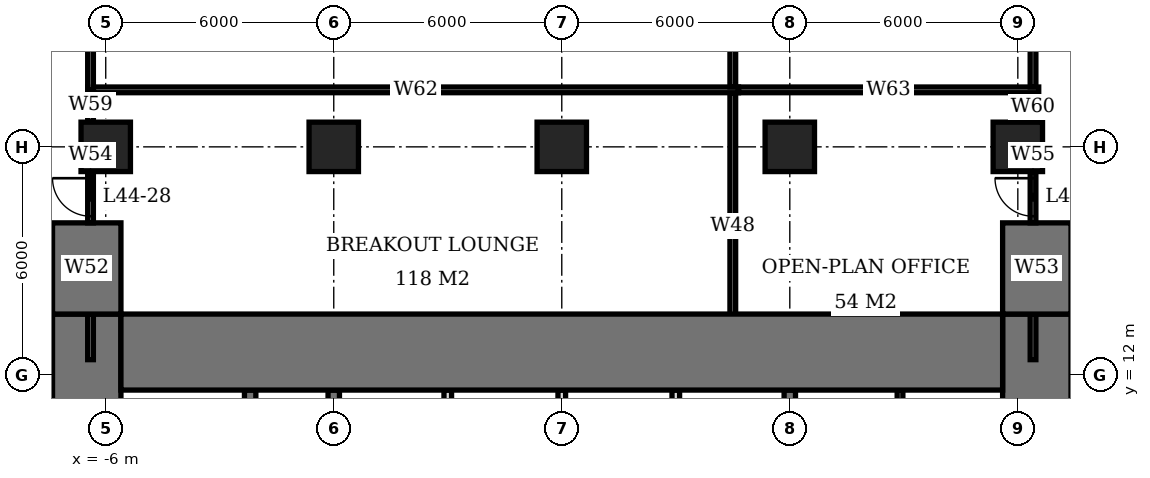
"""IFC4 building model, lengths in metres.
Left out: names, types, materials, properties, quantities, classifications, styles, units other than length and angle.
Written with IfcOpenShell. Run it as: python <this file> out.ifc"""

import sys

from ifc_helpers import new_model, si_unit, direction, frame, frame_2d, origin, origin_2d, place, context, subcontext, project, spatial, rectangle, extrude, element, fill, save


model = new_model("IFC4")
c1 = context("Model", 3, precision=1e-05, world=origin(), true_north=direction((0.0, 1.0)))
c2 = subcontext(c1, "Body", "Model", "MODEL_VIEW")
j1 = project(units=[si_unit("LENGTHUNIT", "METRE"), si_unit("PLANEANGLEUNIT", "RADIAN")], contexts=[c1])
p1 = place(None, origin())
s1 = spatial("IfcSite", under=j1, at=p1, CompositionType="ELEMENT")
p2 = place(p1, origin())
s2 = spatial("IfcBuilding", under=s1, at=p2, CompositionType="ELEMENT")
p3 = place(p2, frame((0.0, 0.0, 181.1)))
s3 = spatial("IfcBuildingStorey", under=s2, at=p3, CompositionType="ELEMENT", Elevation=181.1)
for number, where, z_axis, x_axis in (
    (1, (-6.0, 18.0, 0.0), (0.0, 0.0, 1.0), (1.0, 0.0, 0.0)),
    (2, (0.0, 18.0, 0.0), (0.0, 0.0, 1.0), (1.0, 0.0, 0.0)),
    (3, (6.0, 18.0, 0.0), (0.0, 0.0, 1.0), (1.0, 0.0, 0.0)),
    (4, (12.0, 18.0, 0.0), (0.0, 0.0, 1.0), (1.0, 0.0, 0.0)),
    (5, (18.0, 18.0, 0.0), (0.0, 0.0, 1.0), (1.0, 0.0, 0.0)),
):
    element("IfcColumn", number, at=place(p3, frame(where, z_axis=z_axis, x_axis=x_axis)), inside=s3, PredefinedType="COLUMN", context=c2, shape_type="SweptSolid", body=[
        extrude(rectangle(XDim=1.3, YDim=1.3, at=origin_2d()), origin(), (0.0, 0.0, 1.0), 3.9),
    ])
p4 = place(p3, frame((-5.6, 12.6, 0.0), z_axis=(0.0, 0.0, 1.0), x_axis=(1.0, 0.0, 0.0)))
e6 = element("IfcWall", 6, at=p4, inside=s3, PredefinedType="SHEAR", context=c2, shape_type="SweptSolid", body=[
    extrude(rectangle(XDim=23.2, YDim=2.0, at=frame_2d((11.6, 0.0))), origin(), (0.0, 0.0, 1.0), 3.9),
])
p5 = place(p3, frame((-6.5, -7.6, 0.0), z_axis=(0.0, 0.0, 1.0), x_axis=(0.0, 1.0, 0.0)))
e7 = element("IfcWall", 7, at=p5, inside=s3, PredefinedType="SHEAR", context=c2, shape_type="SweptSolid", body=[
    extrude(rectangle(XDim=21.2, YDim=1.8, at=frame_2d((10.6, 0.0))), origin(), (0.0, 0.0, 1.0), 3.9),
])
p6 = place(p5, frame((7.8, 0.0, 0.0)))
e8 = element("IfcOpeningElement", 8, at=p6, cuts=e7, PredefinedType="OPENING", context=c2, shape_type="SweptSolid", body=[
    extrude(rectangle(XDim=1.8, YDim=2.4, at=frame_2d((0.9, 1.2))), frame((0.0, 0.91, 0.0), z_axis=(0.0, -1.0, 0.0), x_axis=(1.0, 0.0, 0.0)), (0.0, 0.0, 1.0), 1.82),
])
p7 = place(p3, frame((18.5, -7.6, 0.0), z_axis=(0.0, 0.0, 1.0), x_axis=(0.0, 1.0, 0.0)))
e9 = element("IfcWall", 9, at=p7, inside=s3, PredefinedType="SHEAR", context=c2, shape_type="SweptSolid", body=[
    extrude(rectangle(XDim=21.2, YDim=1.8, at=frame_2d((10.6, 0.0))), origin(), (0.0, 0.0, 1.0), 3.9),
])
p8 = place(p7, frame((9.2, 0.0, 0.0)))
e10 = element("IfcOpeningElement", 10, at=p8, cuts=e9, PredefinedType="OPENING", context=c2, shape_type="SweptSolid", body=[
    extrude(rectangle(XDim=1.8, YDim=2.4, at=frame_2d((0.9, 1.2))), frame((0.0, 0.91, 0.0), z_axis=(0.0, -1.0, 0.0), x_axis=(1.0, 0.0, 0.0)), (0.0, 0.0, 1.0), 1.82),
])
for number, where, z_axis, x_axis in (
    (11, (-6.5, 13.6, 0.0), (0.0, 0.0, 1.0), (0.0, 1.0, 0.0)),
    (12, (18.5, 13.6, 0.0), (0.0, 0.0, 1.0), (0.0, 1.0, 0.0)),
):
    element("IfcWall", number, at=place(p3, frame(where, z_axis=z_axis, x_axis=x_axis)), inside=s3, PredefinedType="SHEAR", context=c2, shape_type="SweptSolid", body=[
        extrude(rectangle(XDim=2.4, YDim=1.8, at=frame_2d((1.2, 0.0))), origin(), (0.0, 0.0, 1.0), 3.9),
    ])
p9 = place(p3, frame((0.0, 3.15, 0.0), z_axis=(0.0, 0.0, 1.0), x_axis=(0.0, 1.0, 0.0)))
e13 = element("IfcWall", 13, at=p9, inside=s3, PredefinedType="SHEAR", context=c2, shape_type="SweptSolid", body=[
    extrude(rectangle(XDim=8.45, YDim=0.3, at=frame_2d((4.225, 0.0))), origin(), (0.0, 0.0, 1.0), 3.9),
])
p10 = place(p3, frame((12.0, 6.15, 0.0), z_axis=(0.0, 0.0, 1.0), x_axis=(0.0, 1.0, 0.0)))
e14 = element("IfcWall", 14, at=p10, inside=s3, PredefinedType="SHEAR", context=c2, shape_type="SweptSolid", body=[
    extrude(rectangle(XDim=5.45, YDim=0.3, at=frame_2d((2.725, 0.0))), origin(), (0.0, 0.0, 1.0), 3.9),
])
p11 = place(p3, frame((-2.2, 3.15, 0.0), z_axis=(0.0, 0.0, 1.0), x_axis=(0.0, 1.0, 0.0)))
e15 = element("IfcWall", 15, at=p11, inside=s3, PredefinedType="SHEAR", context=c2, shape_type="SweptSolid", body=[
    extrude(rectangle(XDim=8.45, YDim=0.3, at=frame_2d((4.225, 0.0))), origin(), (0.0, 0.0, 1.0), 3.9),
])
for number, where, z_axis, x_axis in (
    (16, (3.0, 6.15, 0.0), (0.0, 0.0, 1.0), (0.0, 1.0, 0.0)),
    (17, (6.0, 6.15, 0.0), (0.0, 0.0, 1.0), (0.0, 1.0, 0.0)),
    (18, (9.0, 6.15, 0.0), (0.0, 0.0, 1.0), (0.0, 1.0, 0.0)),
):
    element("IfcWall", number, at=place(p3, frame(where, z_axis=z_axis, x_axis=x_axis)), inside=s3, PredefinedType="SOLIDWALL", context=c2, shape_type="SweptSolid", body=[
        extrude(rectangle(XDim=5.45, YDim=0.2, at=frame_2d((2.725, 0.0))), origin(), (0.0, 0.0, 1.0), 3.9),
    ])
p12 = place(p3, frame((14.9, 6.15, 0.0), z_axis=(0.0, 0.0, 1.0), x_axis=(0.0, 1.0, 0.0)))
e19 = element("IfcWall", 19, at=p12, inside=s3, PredefinedType="PLUMBINGWALL", context=c2, shape_type="SweptSolid", body=[
    extrude(rectangle(XDim=5.45, YDim=0.15, at=frame_2d((2.725, 0.0))), origin(), (0.0, 0.0, 1.0), 3.65),
])
p13 = place(p3, frame((-6.4, 12.4, 0.0), z_axis=(0.0, 0.0, 1.0), x_axis=(0.0, 1.0, 0.0)))
e20 = element("IfcWall", 20, at=p13, inside=s3, PredefinedType="PARTITIONING", context=c2, shape_type="SweptSolid", body=[
    extrude(rectangle(XDim=1.2, YDim=0.15, at=frame_2d((0.6, 0.0))), origin(), (0.0, 0.0, 1.0), 3.65),
])
p14 = place(p3, frame((-6.4, 16.0, 0.0), z_axis=(0.0, 0.0, 1.0), x_axis=(0.0, 1.0, 0.0)))
e21 = element("IfcWall", 21, at=p14, inside=s3, PredefinedType="PARTITIONING", context=c2, shape_type="SweptSolid", body=[
    extrude(rectangle(XDim=1.35, YDim=0.15, at=frame_2d((0.675, 0.0))), origin(), (0.0, 0.0, 1.0), 3.65),
])
p15 = place(p14, frame((0.175, 0.0, 0.0)))
e22 = element("IfcOpeningElement", 22, at=p15, cuts=e21, PredefinedType="OPENING", context=c2, shape_type="SweptSolid", body=[
    extrude(rectangle(XDim=1.0, YDim=2.1, at=frame_2d((0.5, 1.05))), frame((0.0, 0.085, 0.0), z_axis=(0.0, -1.0, 0.0), x_axis=(1.0, 0.0, 0.0)), (0.0, 0.0, 1.0), 0.17),
])
p16 = place(p3, frame((-6.4, 18.65, 0.0), z_axis=(0.0, 0.0, 1.0), x_axis=(0.0, 1.0, 0.0)))
e23 = element("IfcWall", 23, at=p16, inside=s3, PredefinedType="PARTITIONING", context=c2, shape_type="SweptSolid", body=[
    extrude(rectangle(XDim=0.925, YDim=0.15, at=frame_2d((0.462, 0.0))), origin(), (0.0, 0.0, 1.0), 3.65),
])
p17 = place(p3, frame((-6.4, 19.5, 0.0), z_axis=(0.0, 0.0, 1.0), x_axis=(0.0, 1.0, 0.0)))
e24 = element("IfcWall", 24, at=p17, inside=s3, PredefinedType="PARTITIONING", context=c2, shape_type="SweptSolid", body=[
    extrude(rectangle(XDim=3.85, YDim=0.15, at=frame_2d((1.925, 0.0))), origin(), (0.0, 0.0, 1.0), 3.65),
])
p18 = place(p17, frame((2.55, 0.0, 0.0)))
e25 = element("IfcOpeningElement", 25, at=p18, cuts=e24, PredefinedType="OPENING", context=c2, shape_type="SweptSolid", body=[
    extrude(rectangle(XDim=1.0, YDim=2.1, at=frame_2d((0.5, 1.05))), frame((0.0, 0.085, 0.0), z_axis=(0.0, -1.0, 0.0), x_axis=(1.0, 0.0, 0.0)), (0.0, 0.0, 1.0), 0.17),
])
p19 = place(p3, frame((-6.325, 19.5, 0.0), z_axis=(0.0, 0.0, 1.0), x_axis=(1.0, 0.0, 0.0)))
e26 = element("IfcWall", 26, at=p19, inside=s3, PredefinedType="PARTITIONING", context=c2, shape_type="SweptSolid", body=[
    extrude(rectangle(XDim=16.975, YDim=0.15, at=frame_2d((8.487, 0.0))), origin(), (0.0, 0.0, 1.0), 3.65),
])
p20 = place(p3, frame((10.5, 12.4, 0.0), z_axis=(0.0, 0.0, 1.0), x_axis=(0.0, 1.0, 0.0)))
e27 = element("IfcWall", 27, at=p20, inside=s3, PredefinedType="PARTITIONING", context=c2, shape_type="SweptSolid", body=[
    extrude(rectangle(XDim=7.025, YDim=0.15, at=frame_2d((3.513, 0.0))), origin(), (0.0, 0.0, 1.0), 3.65),
])
p21 = place(p3, frame((10.5, 19.575, 0.0), z_axis=(0.0, 0.0, 1.0), x_axis=(0.0, 1.0, 0.0)))
e28 = element("IfcWall", 28, at=p21, inside=s3, PredefinedType="PARTITIONING", context=c2, shape_type="SweptSolid", body=[
    extrude(rectangle(XDim=4.35, YDim=0.15, at=frame_2d((2.175, 0.0))), origin(), (0.0, 0.0, 1.0), 3.65),
])
p22 = place(p3, frame((10.65, 19.5, 0.0), z_axis=(0.0, 0.0, 1.0), x_axis=(1.0, 0.0, 0.0)))
e29 = element("IfcWall", 29, at=p22, inside=s3, PredefinedType="PARTITIONING", context=c2, shape_type="SweptSolid", body=[
    extrude(rectangle(XDim=7.9, YDim=0.15, at=frame_2d((3.95, 0.0))), origin(), (0.0, 0.0, 1.0), 3.65),
])
p23 = place(p3, frame((18.4, 12.4, 0.0), z_axis=(0.0, 0.0, 1.0), x_axis=(0.0, 1.0, 0.0)))
e30 = element("IfcWall", 30, at=p23, inside=s3, PredefinedType="PARTITIONING", context=c2, shape_type="SweptSolid", body=[
    extrude(rectangle(XDim=1.2, YDim=0.15, at=frame_2d((0.6, 0.0))), origin(), (0.0, 0.0, 1.0), 3.65),
])
p24 = place(p3, frame((18.4, 16.0, 0.0), z_axis=(0.0, 0.0, 1.0), x_axis=(0.0, 1.0, 0.0)))
e31 = element("IfcWall", 31, at=p24, inside=s3, PredefinedType="PARTITIONING", context=c2, shape_type="SweptSolid", body=[
    extrude(rectangle(XDim=1.35, YDim=0.15, at=frame_2d((0.675, 0.0))), origin(), (0.0, 0.0, 1.0), 3.65),
])
p25 = place(p24, frame((0.175, 0.0, 0.0)))
e32 = element("IfcOpeningElement", 32, at=p25, cuts=e31, PredefinedType="OPENING", context=c2, shape_type="SweptSolid", body=[
    extrude(rectangle(XDim=1.0, YDim=2.1, at=frame_2d((0.5, 1.05))), frame((0.0, 0.085, 0.0), z_axis=(0.0, -1.0, 0.0), x_axis=(1.0, 0.0, 0.0)), (0.0, 0.0, 1.0), 0.17),
])
p26 = place(p3, frame((18.4, 18.65, 0.0), z_axis=(0.0, 0.0, 1.0), x_axis=(0.0, 1.0, 0.0)))
e33 = element("IfcWall", 33, at=p26, inside=s3, PredefinedType="PARTITIONING", context=c2, shape_type="SweptSolid", body=[
    extrude(rectangle(XDim=0.775, YDim=0.15, at=frame_2d((0.388, 0.0))), origin(), (0.0, 0.0, 1.0), 3.65),
])
p27 = place(p3, frame((18.4, 19.575, 0.0), z_axis=(0.0, 0.0, 1.0), x_axis=(0.0, 1.0, 0.0)))
e34 = element("IfcWall", 34, at=p27, inside=s3, PredefinedType="PARTITIONING", context=c2, shape_type="SweptSolid", body=[
    extrude(rectangle(XDim=3.525, YDim=0.15, at=frame_2d((1.763, 0.0))), origin(), (0.0, 0.0, 1.0), 3.65),
])
p28 = place(p27, frame((2.225, 0.0, 0.0)))
e35 = element("IfcOpeningElement", 35, at=p28, cuts=e34, PredefinedType="OPENING", context=c2, shape_type="SweptSolid", body=[
    extrude(rectangle(XDim=1.0, YDim=2.1, at=frame_2d((0.5, 1.05))), frame((0.0, 0.085, 0.0), z_axis=(0.0, -1.0, 0.0), x_axis=(1.0, 0.0, 0.0)), (0.0, 0.0, 1.0), 0.17),
])
p29 = place(p15, origin())
e36 = element("IfcDoor", 36, at=p29, inside=s3, OperationType="SINGLE_SWING_RIGHT", PredefinedType="DOOR", context=c2, shape_type="SweptSolid", body=[
    extrude(rectangle(XDim=1.0, YDim=2.1, at=frame_2d((0.5, 1.05))), frame((0.0, 0.025, 0.0), z_axis=(0.0, -1.0, 0.0), x_axis=(1.0, 0.0, 0.0)), (0.0, 0.0, 1.0), 0.05),
])
fill(e22, e36)
p30 = place(p25, origin())
e37 = element("IfcDoor", 37, at=p30, inside=s3, OperationType="SINGLE_SWING_RIGHT", PredefinedType="DOOR", context=c2, shape_type="SweptSolid", body=[
    extrude(rectangle(XDim=1.0, YDim=2.1, at=frame_2d((0.5, 1.05))), frame((0.0, 0.025, 0.0), z_axis=(0.0, -1.0, 0.0), x_axis=(1.0, 0.0, 0.0)), (0.0, 0.0, 1.0), 0.05),
])
fill(e32, e37)
save(model, sys.argv[1])
